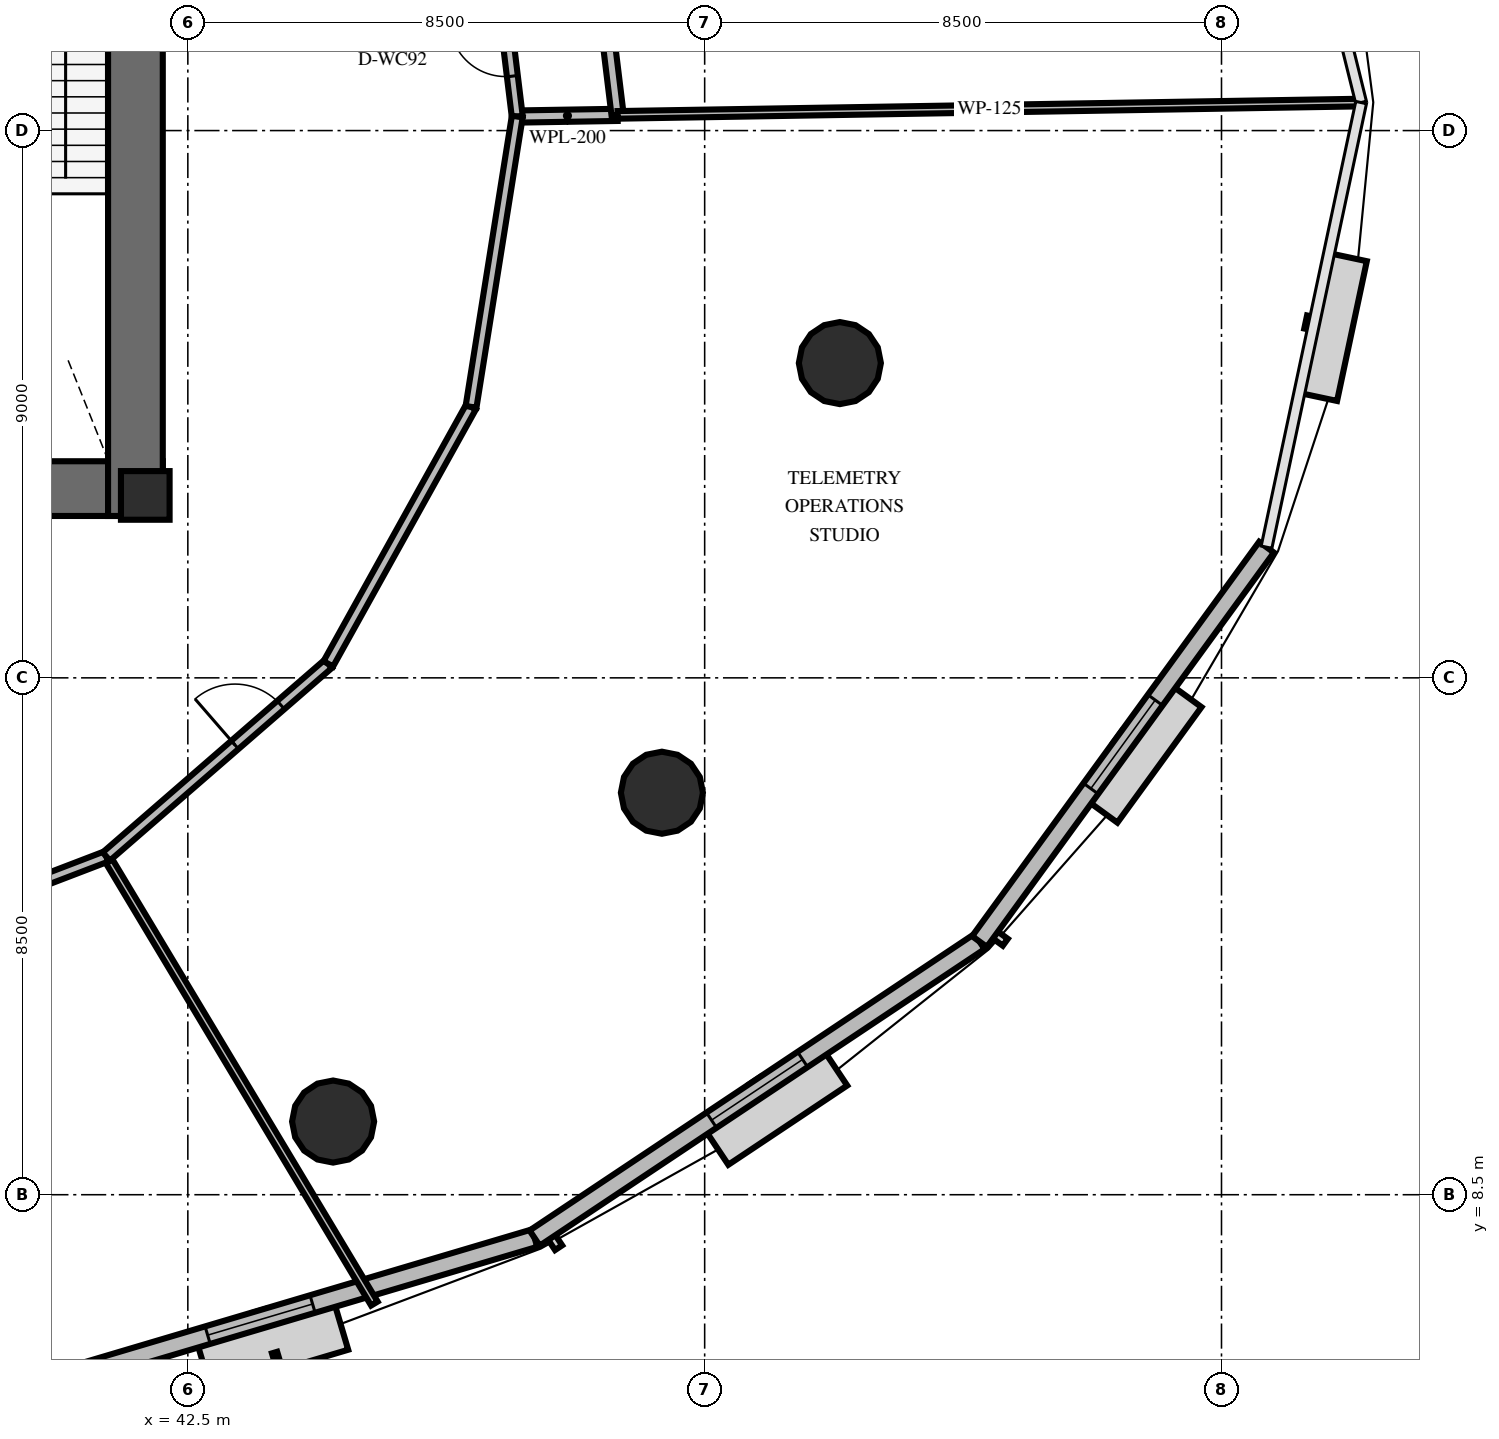
"""IFC4 building model, lengths in metres.
Left out: names, types, materials, properties, quantities, classifications, styles, units other than length and angle.
Written with IfcOpenShell. Run it as: python <this file> out.ifc"""

import sys

from ifc_helpers import new_model, si_unit, direction, frame, frame_2d, origin, origin_2d, place, context, subcontext, project, spatial, rectangle, circle, extrude, element, fill, save


model = new_model("IFC4")
c1 = context("Model", 3, precision=1e-05, world=origin(), true_north=direction((0.0, 1.0)))
c2 = subcontext(c1, "Body", "Model", "MODEL_VIEW")
j1 = project(units=[si_unit("LENGTHUNIT", "METRE"), si_unit("PLANEANGLEUNIT", "RADIAN")], contexts=[c1])
p1 = place(None, origin())
s1 = spatial("IfcSite", under=j1, at=p1, CompositionType="ELEMENT")
p2 = place(p1, origin())
s2 = spatial("IfcBuilding", under=s1, at=p2, CompositionType="ELEMENT")
p3 = place(p2, frame((0.0, 0.0, 34.2)))
s3 = spatial("IfcBuildingStorey", under=s2, at=p3, CompositionType="ELEMENT", Elevation=34.2)
p4 = place(p3, frame((25.922, 20.112, 0.0), z_axis=(0.0, 0.0, 1.0), x_axis=(1.0, 0.0, 0.0)))
e1 = element("IfcWall", 1, at=p4, inside=s3, PredefinedType="SHEAR", context=c2, shape_type="SweptSolid", body=[
    extrude(rectangle(XDim=16.166, YDim=0.9, at=frame_2d((8.083, 0.0))), origin(), (0.0, 0.0, 1.0), 4.2),
])
p5 = place(p3, frame((41.638, 19.662, 0.0), z_axis=(0.0, 0.0, 1.0), x_axis=(0.0, 1.0, 0.0)))
e2 = element("IfcWall", 2, at=p5, inside=s3, PredefinedType="SHEAR", context=c2, shape_type="SweptSolid", body=[
    extrude(rectangle(XDim=10.876, YDim=0.9, at=frame_2d((5.438, 0.0))), origin(), (0.0, 0.0, 1.0), 4.2),
])
p6 = place(p3, frame((41.8, 20.0, 0.0), z_axis=(0.0, 0.0, 1.0), x_axis=(1.0, 0.0, 0.0)))
e3 = element("IfcColumn", 3, at=p6, inside=s3, PredefinedType="PILASTER", context=c2, shape_type="SweptSolid", body=[
    extrude(rectangle(XDim=0.8, YDim=0.8, at=origin_2d()), origin(), (0.0, 0.0, 1.0), 4.2),
])
for number, where, z_axis, x_axis in (
    (4, (44.889, 9.703, 0.0), (0.0, 0.0, 1.0), (1.0, 0.0, 0.0)),
    (5, (50.297, 15.111, 0.0), (0.0, 0.0, 1.0), (1.0, 0.0, 0.0)),
    (6, (53.223, 22.176, 0.0), (0.0, 0.0, 1.0), (1.0, 0.0, 0.0)),
):
    element("IfcColumn", number, at=place(p3, frame(where, z_axis=z_axis, x_axis=x_axis)), inside=s3, PredefinedType="COLUMN", context=c2, shape_type="SweptSolid", body=[
        extrude(circle(Radius=0.675, at=origin_2d()), origin(), (0.0, 0.0, 1.0), 4.2),
    ])
p7 = place(p3, frame((39.175, 5.106, 0.0), z_axis=(0.0, 0.0, 1.0), x_axis=(0.958658357461, 0.284559578418, 0.0)))
e7 = element("IfcWall", 7, at=p7, inside=s3, PredefinedType="SOLIDWALL", context=c2, shape_type="SweptSolid", body=[
    extrude(rectangle(XDim=9.419, YDim=0.3, at=frame_2d((4.709, 0.0))), origin(), (0.0, 0.0, 1.0), 3.0),
])
p8 = place(p7, frame((3.809, 0.0, 0.8)))
e8 = element("IfcOpeningElement", 8, at=p8, cuts=e7, PredefinedType="OPENING", context=c2, shape_type="SweptSolid", body=[
    extrude(rectangle(XDim=1.8, YDim=1.95, at=frame_2d((0.9, 0.975))), frame((0.0, 0.16, 0.0), z_axis=(0.0, -1.0, 0.0), x_axis=(1.0, 0.0, 0.0)), (0.0, 0.0, 1.0), 0.32),
])
p9 = place(p3, frame((48.204, 7.787, 0.0), z_axis=(0.0, 0.0, 1.0), x_axis=(0.832075923979, 0.554661749839, 0.0)))
e9 = element("IfcWall", 9, at=p9, inside=s3, PredefinedType="SOLIDWALL", context=c2, shape_type="SweptSolid", body=[
    extrude(rectangle(XDim=8.793, YDim=0.3, at=frame_2d((4.396, 0.0))), origin(), (0.0, 0.0, 1.0), 3.0),
])
p10 = place(p9, frame((3.496, 0.0, 0.8)))
e10 = element("IfcOpeningElement", 10, at=p10, cuts=e9, PredefinedType="OPENING", context=c2, shape_type="SweptSolid", body=[
    extrude(rectangle(XDim=1.8, YDim=1.95, at=frame_2d((0.9, 0.975))), frame((0.0, 0.16, 0.0), z_axis=(0.0, -1.0, 0.0), x_axis=(1.0, 0.0, 0.0)), (0.0, 0.0, 1.0), 0.32),
])
p11 = place(p3, frame((55.52, 12.664, 0.0), z_axis=(0.0, 0.0, 1.0), x_axis=(0.588470254448, 0.808518867826, 0.0)))
e11 = element("IfcWall", 11, at=p11, inside=s3, PredefinedType="SOLIDWALL", context=c2, shape_type="SweptSolid", body=[
    extrude(rectangle(XDim=8.021, YDim=0.3, at=frame_2d((4.011, 0.0))), origin(), (0.0, 0.0, 1.0), 3.0),
])
p12 = place(p11, frame((3.111, 0.0, 0.8)))
e12 = element("IfcOpeningElement", 12, at=p12, cuts=e11, PredefinedType="OPENING", context=c2, shape_type="SweptSolid", body=[
    extrude(rectangle(XDim=1.8, YDim=1.95, at=frame_2d((0.9, 0.975))), frame((0.0, 0.16, 0.0), z_axis=(0.0, -1.0, 0.0), x_axis=(1.0, 0.0, 0.0)), (0.0, 0.0, 1.0), 0.32),
])
p13 = place(p3, frame((47.918, 26.231, 0.0), z_axis=(0.0, 0.0, 1.0), x_axis=(0.999862656303, 0.016573126758, 0.0)))
e13 = element("IfcWall", 13, at=p13, inside=s3, PredefinedType="PLUMBINGWALL", context=c2, shape_type="SweptSolid", body=[
    extrude(rectangle(XDim=1.65, YDim=0.2, at=frame_2d((0.825, 0.0))), origin(), (0.0, 0.0, 1.0), 3.0),
])
p14 = place(p3, frame((49.568, 26.258, 0.0), z_axis=(0.0, 0.0, 1.0), x_axis=(-0.120978669263, 0.992655107066, 0.0)))
e14 = element("IfcWall", 14, at=p14, inside=s3, PredefinedType="PLUMBINGWALL", context=c2, shape_type="SweptSolid", body=[
    extrude(rectangle(XDim=3.255, YDim=0.2, at=frame_2d((1.627, 0.0))), origin(), (0.0, 0.0, 1.0), 3.0),
])
p15 = place(p3, frame((47.918, 26.231, 0.0), z_axis=(0.0, 0.0, 1.0), x_axis=(-0.121060424007, 0.992645139886, 0.0)))
e15 = element("IfcWall", 15, at=p15, inside=s3, PredefinedType="PARTITIONING", context=c2, shape_type="SweptSolid", body=[
    extrude(rectangle(XDim=2.91, YDim=0.18, at=frame_2d((1.455, 0.0))), origin(), (0.0, 0.0, 1.0), 3.0),
])
p16 = place(p15, frame((0.669, 0.0, 0.0)))
e16 = element("IfcOpeningElement", 16, at=p16, cuts=e15, PredefinedType="OPENING", context=c2, shape_type="SweptSolid", body=[
    extrude(rectangle(XDim=0.92, YDim=2.1, at=frame_2d((0.46, 1.05))), frame((0.0, 0.1, 0.0), z_axis=(0.0, -1.0, 0.0), x_axis=(1.0, 0.0, 0.0)), (0.0, 0.0, 1.0), 0.2),
])
p17 = place(p3, frame((49.568, 26.258, 0.0), z_axis=(0.0, 0.0, 1.0), x_axis=(0.999862395587, 0.016588848418, 0.0)))
e17 = element("IfcWall", 17, at=p17, inside=s3, PredefinedType="PARTITIONING", context=c2, shape_type="SweptSolid", body=[
    extrude(rectangle(XDim=12.23, YDim=0.125, at=frame_2d((6.115, 0.0))), origin(), (0.0, 0.0, 1.0), 3.0),
])
p18 = place(p3, frame((41.159, 14.062, 0.0), z_axis=(0.0, 0.0, 1.0), x_axis=(0.51429890301, -0.857611006437, 0.0)))
e18 = element("IfcWall", 18, at=p18, inside=s3, PredefinedType="PARTITIONING", context=c2, shape_type="SweptSolid", body=[
    extrude(rectangle(XDim=8.573, YDim=0.125, at=frame_2d((4.286, 0.0))), origin(), (0.0, 0.0, 1.0), 3.0),
])
p19 = place(p3, frame((36.644, 12.333, 0.0), z_axis=(0.0, 0.0, 1.0), x_axis=(0.93389765602, 0.35754044258, 0.0)))
e19 = element("IfcWall", 19, at=p19, inside=s3, PredefinedType="PARTITIONING", context=c2, shape_type="SweptSolid", body=[
    extrude(rectangle(XDim=4.834, YDim=0.18, at=frame_2d((2.417, 0.0))), origin(), (0.0, 0.0, 1.0), 3.0),
])
p20 = place(p3, frame((41.159, 14.062, 0.0), z_axis=(0.0, 0.0, 1.0), x_axis=(0.75528570448, 0.655395685527, 0.0)))
e20 = element("IfcWall", 20, at=p20, inside=s3, PredefinedType="PARTITIONING", context=c2, shape_type="SweptSolid", body=[
    extrude(rectangle(XDim=4.834, YDim=0.18, at=frame_2d((2.417, 0.0))), origin(), (0.0, 0.0, 1.0), 3.0),
])
p21 = place(p20, frame((2.801, 0.0, 0.0)))
e21 = element("IfcOpeningElement", 21, at=p21, cuts=e20, PredefinedType="OPENING", context=c2, shape_type="SweptSolid", body=[
    extrude(rectangle(XDim=1.0, YDim=2.15, at=frame_2d((0.5, 1.075))), frame((0.0, 0.1, 0.0), z_axis=(0.0, -1.0, 0.0), x_axis=(1.0, 0.0, 0.0)), (0.0, 0.0, 1.0), 0.2),
])
p22 = place(p3, frame((44.81, 17.23, 0.0), z_axis=(0.0, 0.0, 1.0), x_axis=(0.48557861103, 0.874193006441, 0.0)))
e22 = element("IfcWall", 22, at=p22, inside=s3, PredefinedType="PARTITIONING", context=c2, shape_type="SweptSolid", body=[
    extrude(rectangle(XDim=4.834, YDim=0.18, at=frame_2d((2.417, 0.0))), origin(), (0.0, 0.0, 1.0), 3.0),
])
p23 = place(p3, frame((47.158, 21.457, 0.0), z_axis=(0.0, 0.0, 1.0), x_axis=(0.15731094414, 0.987549121236, 0.0)))
e23 = element("IfcWall", 23, at=p23, inside=s3, PredefinedType="PARTITIONING", context=c2, shape_type="SweptSolid", body=[
    extrude(rectangle(XDim=4.834, YDim=0.18, at=frame_2d((2.417, 0.0))), origin(), (0.0, 0.0, 1.0), 3.0),
])
p24 = place(p8, origin())
e24 = element("IfcWindow", 24, at=p24, inside=s3, PartitioningType="SINGLE_PANEL", PredefinedType="WINDOW", context=c2, shape_type="SweptSolid", body=[
    extrude(rectangle(XDim=1.8, YDim=1.95, at=frame_2d((0.9, 0.975))), frame((0.0, 0.03, 0.0), z_axis=(0.0, -1.0, 0.0), x_axis=(1.0, 0.0, 0.0)), (0.0, 0.0, 1.0), 0.06),
])
fill(e8, e24)
p25 = place(p10, origin())
e25 = element("IfcWindow", 25, at=p25, inside=s3, PartitioningType="SINGLE_PANEL", PredefinedType="WINDOW", context=c2, shape_type="SweptSolid", body=[
    extrude(rectangle(XDim=1.8, YDim=1.95, at=frame_2d((0.9, 0.975))), frame((0.0, 0.03, 0.0), z_axis=(0.0, -1.0, 0.0), x_axis=(1.0, 0.0, 0.0)), (0.0, 0.0, 1.0), 0.06),
])
fill(e10, e25)
p26 = place(p12, origin())
e26 = element("IfcWindow", 26, at=p26, inside=s3, PartitioningType="SINGLE_PANEL", PredefinedType="WINDOW", context=c2, shape_type="SweptSolid", body=[
    extrude(rectangle(XDim=1.8, YDim=1.95, at=frame_2d((0.9, 0.975))), frame((0.0, 0.03, 0.0), z_axis=(0.0, -1.0, 0.0), x_axis=(1.0, 0.0, 0.0)), (0.0, 0.0, 1.0), 0.06),
])
fill(e12, e26)
p27 = place(p16, origin())
e27 = element("IfcDoor", 27, at=p27, inside=s3, OperationType="SINGLE_SWING_RIGHT", PredefinedType="DOOR", context=c2, shape_type="SweptSolid", body=[
    extrude(rectangle(XDim=0.92, YDim=2.1, at=frame_2d((0.46, 1.05))), frame((0.0, 0.025, 0.0), z_axis=(0.0, -1.0, 0.0), x_axis=(1.0, 0.0, 0.0)), (0.0, 0.0, 1.0), 0.05),
])
fill(e16, e27)
p28 = place(p21, origin())
e28 = element("IfcDoor", 28, at=p28, inside=s3, OperationType="SINGLE_SWING_LEFT", PredefinedType="DOOR", context=c2, shape_type="SweptSolid", body=[
    extrude(rectangle(XDim=1.0, YDim=2.15, at=frame_2d((0.5, 1.075))), frame((0.0, 0.025, 0.0), z_axis=(0.0, -1.0, 0.0), x_axis=(1.0, 0.0, 0.0)), (0.0, 0.0, 1.0), 0.05),
])
fill(e21, e28)
save(model, sys.argv[1])
